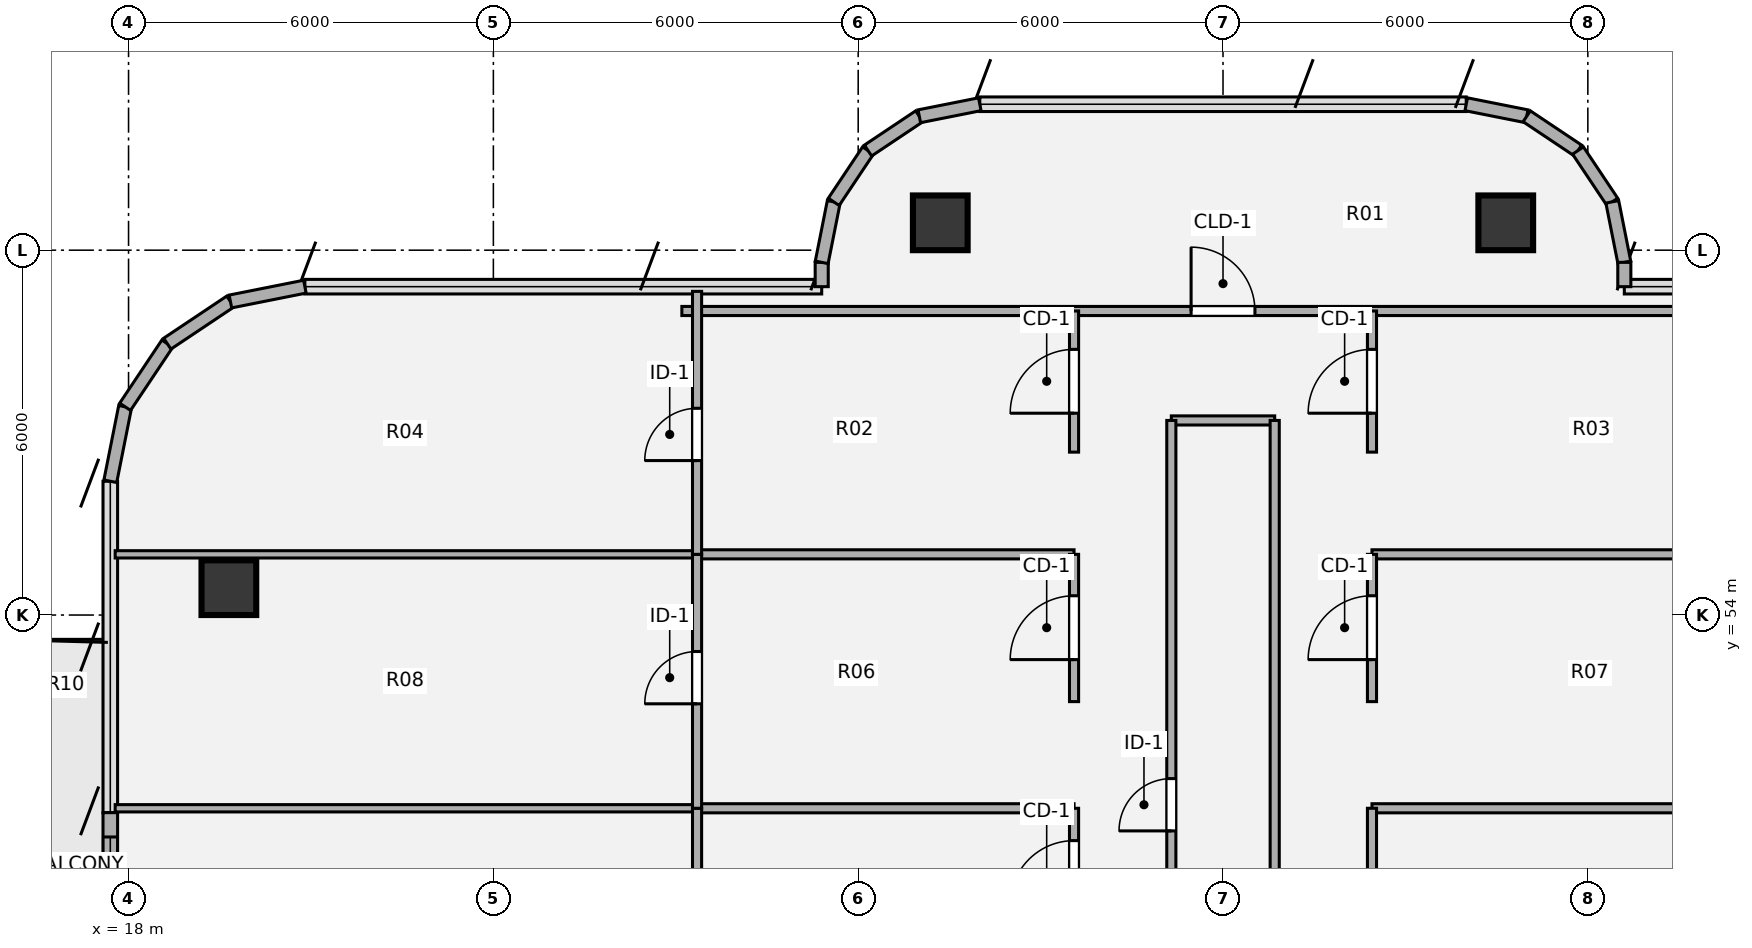
"""IFC4 building model, lengths in metres.
Left out: names, types, materials, properties, quantities, classifications, styles, units other than length and angle.
Written with IfcOpenShell. Run it as: python <this file> out.ifc"""

import sys

from ifc_helpers import new_model, si_unit, direction, frame, frame_2d, origin, origin_2d, place, context, subcontext, project, spatial, rectangle, hollow_circle, extrude, source, transform, mapped, element, fill, save


model = new_model("IFC4")
c1 = context("Model", 3, precision=1e-05, world=origin(), true_north=direction((0.0, 1.0)))
c2 = subcontext(c1, "Body", "Model", "MODEL_VIEW")
j1 = project(units=[si_unit("LENGTHUNIT", "METRE"), si_unit("PLANEANGLEUNIT", "RADIAN")], contexts=[c1])
p1 = place(None, origin())
s1 = spatial("IfcSite", under=j1, at=p1, CompositionType="ELEMENT")
p2 = place(p1, origin())
s2 = spatial("IfcBuilding", under=s1, at=p2, CompositionType="ELEMENT")
p3 = place(p2, frame((0.0, 0.0, 264.6)))
s3 = spatial("IfcBuildingStorey", under=s2, at=p3, CompositionType="ELEMENT", Elevation=264.6)
m1 = source(origin(), c2, "Body", "SweptSolid", [
    extrude(hollow_circle(Radius=0.45, WallThickness=0.032, at=origin_2d()), origin(), (0.0, 0.0, 1.0), 3.78),
])
for number, where, z_axis, x_axis in (
    (1, (19.65, 54.45, 0.0), (0.0, 0.0, 1.0), (1.0, 0.0, 0.0)),
    (2, (31.35, 60.45, 0.0), (0.0, 0.0, 1.0), (1.0, 0.0, 0.0)),
    (3, (40.65, 60.45, 0.0), (0.0, 0.0, 1.0), (1.0, 0.0, 0.0)),
):
    element("IfcColumn", number, at=place(p3, frame(where, z_axis=z_axis, x_axis=x_axis)), inside=s3, PredefinedType="COLUMN", context=c2, shape_type="MappedRepresentation", body=[
        mapped(m1, transform((0.0, 0.0, 0.0), x_axis=(1.0, 0.0, 0.0), y_axis=(0.0, 1.0, 0.0), z_axis=(0.0, 0.0, 1.0), scale=1.0)),
    ])
p4 = place(p3, frame((17.7, 47.15, 0.0), z_axis=(0.0, 0.0, 1.0), x_axis=(0.0, 1.0, 0.0)))
e4 = element("IfcWall", 4, at=p4, inside=s3, PredefinedType="SOLIDWALL", context=c2, shape_type="SweptSolid", body=[
    extrude(rectangle(XDim=3.6, YDim=0.24, at=frame_2d((1.8, 0.0))), origin(), (0.0, 0.0, 1.0), 3.53),
])
p5 = place(p4, frame((0.4, 0.0, 0.0)))
e5 = element("IfcOpeningElement", 5, at=p5, cuts=e4, PredefinedType="OPENING", context=c2, shape_type="SweptSolid", body=[
    extrude(rectangle(XDim=1.05, YDim=2.15, at=origin_2d()), frame((0.525, 0.13, 1.075), z_axis=(0.0, -1.0, 0.0), x_axis=(1.0, 0.0, 0.0)), (0.0, 0.0, 1.0), 0.26),
])
p6 = place(p4, frame((1.85, 0.0, 0.85)))
e6 = element("IfcOpeningElement", 6, at=p6, cuts=e4, PredefinedType="OPENING", context=c2, shape_type="SweptSolid", body=[
    extrude(rectangle(XDim=1.35, YDim=1.35, at=origin_2d()), frame((0.675, 0.13, 0.675), z_axis=(0.0, -1.0, 0.0), x_axis=(1.0, 0.0, 0.0)), (0.0, 0.0, 1.0), 0.26),
])
for number, where, z_axis, x_axis in (
    (7, (17.7, 56.2, 0.0), (0.0, 0.0, 1.0), (0.195, 0.981, 0.0)),
    (8, (17.944, 57.425, 0.0), (0.0, 0.0, 1.0), (0.556, 0.831, 0.0)),
    (9, (18.637, 58.463, 0.0), (0.0, 0.0, 1.0), (0.831, 0.556, 0.0)),
    (10, (19.675, 59.156, 0.0), (0.0, 0.0, 1.0), (0.981, 0.195, 0.0)),
):
    element("IfcWall", number, at=place(p3, frame(where, z_axis=z_axis, x_axis=x_axis)), inside=s3, PredefinedType="SOLIDWALL", context=c2, shape_type="SweptSolid", body=[
        extrude(rectangle(XDim=1.249, YDim=0.215, at=frame_2d((0.624, 0.0))), origin(), (0.0, 0.0, 1.0), 3.53),
    ])
p7 = place(p3, frame((29.4, 59.4, 0.0), z_axis=(0.0, 0.0, 1.0), x_axis=(0.0, 1.0, 0.0)))
e11 = element("IfcWall", 11, at=p7, inside=s3, PredefinedType="SOLIDWALL", context=c2, shape_type="SweptSolid", body=[
    extrude(rectangle(XDim=0.4, YDim=0.215, at=frame_2d((0.2, 0.0))), origin(), (0.0, 0.0, 1.0), 3.53),
])
p8 = place(p3, frame((29.4, 59.8, 0.0), z_axis=(0.0, 0.0, 1.0), x_axis=(0.195190360752, 0.980765376158, 0.0)))
e12 = element("IfcWall", 12, at=p8, inside=s3, PredefinedType="SOLIDWALL", context=c2, shape_type="SweptSolid", body=[
    extrude(rectangle(XDim=1.014, YDim=0.215, at=frame_2d((0.507, 0.0))), origin(), (0.0, 0.0, 1.0), 3.53),
])
p9 = place(p3, frame((29.598, 60.795, 0.0), z_axis=(0.0, 0.0, 1.0), x_axis=(0.555643898837, 0.831420385657, 0.0)))
e13 = element("IfcWall", 13, at=p9, inside=s3, PredefinedType="SOLIDWALL", context=c2, shape_type="SweptSolid", body=[
    extrude(rectangle(XDim=1.015, YDim=0.215, at=frame_2d((0.507, 0.0))), origin(), (0.0, 0.0, 1.0), 3.53),
])
p10 = place(p3, frame((30.162, 61.638, 0.0), z_axis=(0.0, 0.0, 1.0), x_axis=(0.831346067305, 0.555755086685, 0.0)))
e14 = element("IfcWall", 14, at=p10, inside=s3, PredefinedType="SOLIDWALL", context=c2, shape_type="SweptSolid", body=[
    extrude(rectangle(XDim=1.014, YDim=0.215, at=frame_2d((0.507, 0.0))), origin(), (0.0, 0.0, 1.0), 3.53),
])
for number, where, z_axis, x_axis in (
    (15, (31.005, 62.202, 0.0), (0.0, 0.0, 1.0), (0.981, 0.195, 0.0)),
    (16, (40.0, 62.4, 0.0), (0.0, 0.0, 1.0), (0.981, -0.195, 0.0)),
):
    element("IfcWall", number, at=place(p3, frame(where, z_axis=z_axis, x_axis=x_axis)), inside=s3, PredefinedType="SOLIDWALL", context=c2, shape_type="SweptSolid", body=[
        extrude(rectangle(XDim=1.015, YDim=0.215, at=frame_2d((0.507, 0.0))), origin(), (0.0, 0.0, 1.0), 3.53),
    ])
p11 = place(p3, frame((40.995, 62.202, 0.0), z_axis=(0.0, 0.0, 1.0), x_axis=(0.831346067305, -0.555755086685, 0.0)))
e17 = element("IfcWall", 17, at=p11, inside=s3, PredefinedType="SOLIDWALL", context=c2, shape_type="SweptSolid", body=[
    extrude(rectangle(XDim=1.014, YDim=0.215, at=frame_2d((0.507, 0.0))), origin(), (0.0, 0.0, 1.0), 3.53),
])
p12 = place(p3, frame((41.838, 61.638, 0.0), z_axis=(0.0, 0.0, 1.0), x_axis=(0.555643898837, -0.831420385657, 0.0)))
e18 = element("IfcWall", 18, at=p12, inside=s3, PredefinedType="SOLIDWALL", context=c2, shape_type="SweptSolid", body=[
    extrude(rectangle(XDim=1.015, YDim=0.215, at=frame_2d((0.507, 0.0))), origin(), (0.0, 0.0, 1.0), 3.53),
])
p13 = place(p3, frame((42.402, 60.795, 0.0), z_axis=(0.0, 0.0, 1.0), x_axis=(0.195190360752, -0.980765376158, 0.0)))
e19 = element("IfcWall", 19, at=p13, inside=s3, PredefinedType="SOLIDWALL", context=c2, shape_type="SweptSolid", body=[
    extrude(rectangle(XDim=1.014, YDim=0.215, at=frame_2d((0.507, 0.0))), origin(), (0.0, 0.0, 1.0), 3.53),
])
p14 = place(p3, frame((42.6, 59.8, 0.0), z_axis=(0.0, 0.0, 1.0), x_axis=(0.0, -1.0, 0.0)))
e20 = element("IfcWall", 20, at=p14, inside=s3, PredefinedType="SOLIDWALL", context=c2, shape_type="SweptSolid", body=[
    extrude(rectangle(XDim=0.4, YDim=0.215, at=frame_2d((0.2, 0.0))), origin(), (0.0, 0.0, 1.0), 3.53),
])
p15 = place(p3, frame((17.78, 50.822, 0.0), z_axis=(0.0, 0.0, 1.0), x_axis=(1.0, 0.0, 0.0)))
e21 = element("IfcWall", 21, at=p15, inside=s3, PredefinedType="PARTITIONING", context=c2, shape_type="SweptSolid", body=[
    extrude(rectangle(XDim=9.57, YDim=0.12, at=frame_2d((4.785, 0.0))), origin(), (0.0, 0.0, 1.0), 2.982),
])
p16 = place(p3, frame((27.35, 50.822, 0.0), z_axis=(0.0, 0.0, 1.0), x_axis=(1.0, 0.0, 0.0)))
e22 = element("IfcWall", 22, at=p16, inside=s3, PredefinedType="PARTITIONING", context=c2, shape_type="SweptSolid", body=[
    extrude(rectangle(XDim=6.2, YDim=0.15, at=frame_2d((3.1, 0.0))), origin(), (0.0, 0.0, 1.0), 2.982),
])
p17 = place(p3, frame((38.45, 50.822, 0.0), z_axis=(0.0, 0.0, 1.0), x_axis=(1.0, 0.0, 0.0)))
e23 = element("IfcWall", 23, at=p17, inside=s3, PredefinedType="PARTITIONING", context=c2, shape_type="SweptSolid", body=[
    extrude(rectangle(XDim=15.77, YDim=0.15, at=frame_2d((7.885, 0.0))), origin(), (0.0, 0.0, 1.0), 2.982),
])
p18 = place(p3, frame((17.78, 54.998, 0.0), z_axis=(0.0, 0.0, 1.0), x_axis=(1.0, 0.0, 0.0)))
e24 = element("IfcWall", 24, at=p18, inside=s3, PredefinedType="PARTITIONING", context=c2, shape_type="SweptSolid", body=[
    extrude(rectangle(XDim=9.57, YDim=0.12, at=frame_2d((4.785, 0.0))), origin(), (0.0, 0.0, 1.0), 3.5),
])
for number, where, z_axis, x_axis in (
    (25, (27.35, 54.998, 0.0), (0.0, 0.0, 1.0), (1.0, 0.0, 0.0)),
    (26, (38.45, 54.998, 0.0), (0.0, 0.0, 1.0), (1.0, 0.0, 0.0)),
):
    element("IfcWall", number, at=place(p3, frame(where, z_axis=z_axis, x_axis=x_axis)), inside=s3, PredefinedType="PARTITIONING", context=c2, shape_type="SweptSolid", body=[
        extrude(rectangle(XDim=6.2, YDim=0.15, at=frame_2d((3.1, 0.0))), origin(), (0.0, 0.0, 1.0), 3.259),
    ])
p19 = place(p3, frame((35.15, 57.2, 0.0), z_axis=(0.0, 0.0, 1.0), x_axis=(1.0, 0.0, 0.0)))
e27 = element("IfcWall", 27, at=p19, inside=s3, PredefinedType="PARTITIONING", context=c2, shape_type="SweptSolid", body=[
    extrude(rectangle(XDim=1.7, YDim=0.15, at=frame_2d((0.85, 0.0))), origin(), (0.0, 0.0, 1.0), 3.308),
])
p20 = place(p3, frame((27.1, 59.0, 0.0), z_axis=(0.0, 0.0, 1.0), x_axis=(1.0, 0.0, 0.0)))
e28 = element("IfcWall", 28, at=p20, inside=s3, PredefinedType="PARTITIONING", context=c2, shape_type="SweptSolid", body=[
    extrude(rectangle(XDim=17.8, YDim=0.15, at=frame_2d((8.9, 0.0))), origin(), (0.0, 0.0, 1.0), 3.308),
])
p21 = place(p20, frame((8.375, 0.0, 0.0)))
e29 = element("IfcOpeningElement", 29, at=p21, cuts=e28, PredefinedType="OPENING", context=c2, shape_type="SweptSolid", body=[
    extrude(rectangle(XDim=1.05, YDim=2.1, at=origin_2d()), frame((0.525, 0.085, 1.05), z_axis=(0.0, -1.0, 0.0), x_axis=(1.0, 0.0, 0.0)), (0.0, 0.0, 1.0), 0.17),
])
p22 = place(p3, frame((27.35, 46.298, 0.0), z_axis=(0.0, 0.0, 1.0), x_axis=(0.0, 1.0, 0.0)))
e30 = element("IfcWall", 30, at=p22, inside=s3, PredefinedType="PARTITIONING", context=c2, shape_type="SweptSolid", body=[
    extrude(rectangle(XDim=4.524, YDim=0.15, at=frame_2d((2.262, 0.0))), origin(), (0.0, 0.0, 1.0), 3.5),
])
p23 = place(p22, frame((1.742, 0.0, 0.0)))
e31 = element("IfcOpeningElement", 31, at=p23, cuts=e30, PredefinedType="OPENING", context=c2, shape_type="SweptSolid", body=[
    extrude(rectangle(XDim=0.86, YDim=2.1, at=origin_2d()), frame((0.43, 0.085, 1.05), z_axis=(0.0, -1.0, 0.0), x_axis=(1.0, 0.0, 0.0)), (0.0, 0.0, 1.0), 0.17),
])
p24 = place(p3, frame((27.35, 50.822, 0.0), z_axis=(0.0, 0.0, 1.0), x_axis=(0.0, 1.0, 0.0)))
e32 = element("IfcWall", 32, at=p24, inside=s3, PredefinedType="PARTITIONING", context=c2, shape_type="SweptSolid", body=[
    extrude(rectangle(XDim=4.176, YDim=0.15, at=frame_2d((2.088, 0.0))), origin(), (0.0, 0.0, 1.0), 3.5),
])
p25 = place(p24, frame((1.718, 0.0, 0.0)))
e33 = element("IfcOpeningElement", 33, at=p25, cuts=e32, PredefinedType="OPENING", context=c2, shape_type="SweptSolid", body=[
    extrude(rectangle(XDim=0.86, YDim=2.1, at=origin_2d()), frame((0.43, 0.085, 1.05), z_axis=(0.0, -1.0, 0.0), x_axis=(1.0, 0.0, 0.0)), (0.0, 0.0, 1.0), 0.17),
])
p26 = place(p3, frame((27.35, 54.998, 0.0), z_axis=(0.0, 0.0, 1.0), x_axis=(0.0, 1.0, 0.0)))
e34 = element("IfcWall", 34, at=p26, inside=s3, PredefinedType="PARTITIONING", context=c2, shape_type="SweptSolid", body=[
    extrude(rectangle(XDim=4.324, YDim=0.15, at=frame_2d((2.162, 0.0))), origin(), (0.0, 0.0, 1.0), 3.5),
])
p27 = place(p26, frame((1.542, 0.0, 0.0)))
e35 = element("IfcOpeningElement", 35, at=p27, cuts=e34, PredefinedType="OPENING", context=c2, shape_type="SweptSolid", body=[
    extrude(rectangle(XDim=0.86, YDim=2.1, at=origin_2d()), frame((0.43, 0.085, 1.05), z_axis=(0.0, -1.0, 0.0), x_axis=(1.0, 0.0, 0.0)), (0.0, 0.0, 1.0), 0.17),
])
p28 = place(p3, frame((33.55, 48.698, 0.0), z_axis=(0.0, 0.0, 1.0), x_axis=(0.0, 1.0, 0.0)))
e36 = element("IfcWall", 36, at=p28, inside=s3, PredefinedType="PARTITIONING", context=c2, shape_type="SweptSolid", body=[
    extrude(rectangle(XDim=2.124, YDim=0.15, at=frame_2d((1.062, 0.0))), origin(), (0.0, 0.0, 1.0), 3.5),
])
p29 = place(p28, frame((0.542, 0.0, 0.0)))
e37 = element("IfcOpeningElement", 37, at=p29, cuts=e36, PredefinedType="OPENING", context=c2, shape_type="SweptSolid", body=[
    extrude(rectangle(XDim=1.05, YDim=2.1, at=origin_2d()), frame((0.525, 0.085, 1.05), z_axis=(0.0, -1.0, 0.0), x_axis=(1.0, 0.0, 0.0)), (0.0, 0.0, 1.0), 0.17),
])
p30 = place(p3, frame((33.55, 52.576, 0.0), z_axis=(0.0, 0.0, 1.0), x_axis=(0.0, 1.0, 0.0)))
e38 = element("IfcWall", 38, at=p30, inside=s3, PredefinedType="PARTITIONING", context=c2, shape_type="SweptSolid", body=[
    extrude(rectangle(XDim=2.422, YDim=0.15, at=frame_2d((1.211, 0.0))), origin(), (0.0, 0.0, 1.0), 3.5),
])
p31 = place(p30, frame((0.691, 0.0, 0.0)))
e39 = element("IfcOpeningElement", 39, at=p31, cuts=e38, PredefinedType="OPENING", context=c2, shape_type="SweptSolid", body=[
    extrude(rectangle(XDim=1.05, YDim=2.1, at=origin_2d()), frame((0.525, 0.085, 1.05), z_axis=(0.0, -1.0, 0.0), x_axis=(1.0, 0.0, 0.0)), (0.0, 0.0, 1.0), 0.17),
])
p32 = place(p3, frame((33.55, 56.679, 0.0), z_axis=(0.0, 0.0, 1.0), x_axis=(0.0, 1.0, 0.0)))
e40 = element("IfcWall", 40, at=p32, inside=s3, PredefinedType="PARTITIONING", context=c2, shape_type="SweptSolid", body=[
    extrude(rectangle(XDim=2.321, YDim=0.15, at=frame_2d((1.161, 0.0))), origin(), (0.0, 0.0, 1.0), 3.5),
])
p33 = place(p32, frame((0.64, 0.0, 0.0)))
e41 = element("IfcOpeningElement", 41, at=p33, cuts=e40, PredefinedType="OPENING", context=c2, shape_type="SweptSolid", body=[
    extrude(rectangle(XDim=1.05, YDim=2.1, at=origin_2d()), frame((0.525, 0.085, 1.05), z_axis=(0.0, -1.0, 0.0), x_axis=(1.0, 0.0, 0.0)), (0.0, 0.0, 1.0), 0.17),
])
p34 = place(p3, frame((35.15, 44.62, 0.0), z_axis=(0.0, 0.0, 1.0), x_axis=(0.0, 1.0, 0.0)))
e42 = element("IfcWall", 42, at=p34, inside=s3, PredefinedType="PARTITIONING", context=c2, shape_type="SweptSolid", body=[
    extrude(rectangle(XDim=12.58, YDim=0.15, at=frame_2d((6.29, 0.0))), origin(), (0.0, 0.0, 1.0), 3.5),
])
p35 = place(p34, frame((5.83, 0.0, 0.0)))
e43 = element("IfcOpeningElement", 43, at=p35, cuts=e42, PredefinedType="OPENING", context=c2, shape_type="SweptSolid", body=[
    extrude(rectangle(XDim=0.86, YDim=2.1, at=origin_2d()), frame((0.43, 0.085, 1.05), z_axis=(0.0, -1.0, 0.0), x_axis=(1.0, 0.0, 0.0)), (0.0, 0.0, 1.0), 0.17),
])
p36 = place(p3, frame((36.85, 44.62, 0.0), z_axis=(0.0, 0.0, 1.0), x_axis=(0.0, 1.0, 0.0)))
e44 = element("IfcWall", 44, at=p36, inside=s3, PredefinedType="PARTITIONING", context=c2, shape_type="SweptSolid", body=[
    extrude(rectangle(XDim=12.58, YDim=0.15, at=frame_2d((6.29, 0.0))), origin(), (0.0, 0.0, 1.0), 3.5),
])
p37 = place(p3, frame((38.45, 46.298, 0.0), z_axis=(0.0, 0.0, 1.0), x_axis=(0.0, 1.0, 0.0)))
e45 = element("IfcWall", 45, at=p37, inside=s3, PredefinedType="PARTITIONING", context=c2, shape_type="SweptSolid", body=[
    extrude(rectangle(XDim=4.524, YDim=0.15, at=frame_2d((2.262, 0.0))), origin(), (0.0, 0.0, 1.0), 3.5),
])
p38 = place(p37, frame((1.737, 0.0, 0.0)))
e46 = element("IfcOpeningElement", 46, at=p38, cuts=e45, PredefinedType="OPENING", context=c2, shape_type="SweptSolid", body=[
    extrude(rectangle(XDim=1.05, YDim=2.1, at=origin_2d()), frame((0.525, 0.085, 1.05), z_axis=(0.0, -1.0, 0.0), x_axis=(1.0, 0.0, 0.0)), (0.0, 0.0, 1.0), 0.17),
])
p39 = place(p3, frame((38.45, 52.576, 0.0), z_axis=(0.0, 0.0, 1.0), x_axis=(0.0, 1.0, 0.0)))
e47 = element("IfcWall", 47, at=p39, inside=s3, PredefinedType="PARTITIONING", context=c2, shape_type="SweptSolid", body=[
    extrude(rectangle(XDim=2.422, YDim=0.15, at=frame_2d((1.211, 0.0))), origin(), (0.0, 0.0, 1.0), 3.5),
])
p40 = place(p39, frame((0.691, 0.0, 0.0)))
e48 = element("IfcOpeningElement", 48, at=p40, cuts=e47, PredefinedType="OPENING", context=c2, shape_type="SweptSolid", body=[
    extrude(rectangle(XDim=1.05, YDim=2.1, at=origin_2d()), frame((0.525, 0.085, 1.05), z_axis=(0.0, -1.0, 0.0), x_axis=(1.0, 0.0, 0.0)), (0.0, 0.0, 1.0), 0.17),
])
p41 = place(p3, frame((38.45, 56.679, 0.0), z_axis=(0.0, 0.0, 1.0), x_axis=(0.0, 1.0, 0.0)))
e49 = element("IfcWall", 49, at=p41, inside=s3, PredefinedType="PARTITIONING", context=c2, shape_type="SweptSolid", body=[
    extrude(rectangle(XDim=2.321, YDim=0.15, at=frame_2d((1.161, 0.0))), origin(), (0.0, 0.0, 1.0), 3.5),
])
p42 = place(p41, frame((0.64, 0.0, 0.0)))
e50 = element("IfcOpeningElement", 50, at=p42, cuts=e49, PredefinedType="OPENING", context=c2, shape_type="SweptSolid", body=[
    extrude(rectangle(XDim=1.05, YDim=2.1, at=origin_2d()), frame((0.525, 0.085, 1.05), z_axis=(0.0, -1.0, 0.0), x_axis=(1.0, 0.0, 0.0)), (0.0, 0.0, 1.0), 0.17),
])
m2 = source(origin(), c2, "Body", "SweptSolid", [
    extrude(rectangle(XDim=1.35, YDim=1.35, at=origin_2d()), frame((0.675, 0.03, 0.675), z_axis=(0.0, -1.0, 0.0), x_axis=(1.0, 0.0, 0.0)), (0.0, 0.0, 1.0), 0.06),
])
p43 = place(p6, origin())
e51 = element("IfcWindow", 51, at=p43, inside=s3, PartitioningType="SINGLE_PANEL", PredefinedType="WINDOW", context=c2, shape_type="MappedRepresentation", body=[
    mapped(m2, transform((0.0, 0.0, 0.0), x_axis=(1.0, 0.0, 0.0), y_axis=(0.0, 1.0, 0.0), z_axis=(0.0, 0.0, 1.0), scale=1.0)),
])
fill(e6, e51)
m3 = source(origin(), c2, "Body", "SweptSolid", [
    extrude(rectangle(XDim=1.05, YDim=2.1, at=origin_2d()), frame((0.525, 0.025, 1.05), z_axis=(0.0, -1.0, 0.0), x_axis=(1.0, 0.0, 0.0)), (0.0, 0.0, 1.0), 0.05),
])
p44 = place(p21, origin())
e52 = element("IfcDoor", 52, at=p44, inside=s3, OperationType="SINGLE_SWING_LEFT", PredefinedType="DOOR", context=c2, shape_type="MappedRepresentation", body=[
    mapped(m3, transform((0.0, 0.0, 0.0), x_axis=(1.0, 0.0, 0.0), y_axis=(0.0, 1.0, 0.0), z_axis=(0.0, 0.0, 1.0), scale=1.0)),
])
fill(e29, e52)
m4 = source(origin(), c2, "Body", "SweptSolid", [
    extrude(rectangle(XDim=0.86, YDim=2.1, at=origin_2d()), frame((0.43, 0.025, 1.05), z_axis=(0.0, -1.0, 0.0), x_axis=(1.0, 0.0, 0.0)), (0.0, 0.0, 1.0), 0.05),
])
p45 = place(p25, origin())
e53 = element("IfcDoor", 53, at=p45, inside=s3, OperationType="SINGLE_SWING_LEFT", PredefinedType="DOOR", context=c2, shape_type="MappedRepresentation", body=[
    mapped(m4, transform((0.0, 0.0, 0.0), x_axis=(1.0, 0.0, 0.0), y_axis=(0.0, 1.0, 0.0), z_axis=(0.0, 0.0, 1.0), scale=1.0)),
])
fill(e33, e53)
p46 = place(p27, origin())
e54 = element("IfcDoor", 54, at=p46, inside=s3, OperationType="SINGLE_SWING_LEFT", PredefinedType="DOOR", context=c2, shape_type="MappedRepresentation", body=[
    mapped(m4, transform((0.0, 0.0, 0.0), x_axis=(1.0, 0.0, 0.0), y_axis=(0.0, 1.0, 0.0), z_axis=(0.0, 0.0, 1.0), scale=1.0)),
])
fill(e35, e54)
m5 = source(origin(), c2, "Body", "SweptSolid", [
    extrude(rectangle(XDim=1.05, YDim=2.1, at=origin_2d()), frame((0.525, 0.025, 1.05), z_axis=(0.0, -1.0, 0.0), x_axis=(1.0, 0.0, 0.0)), (0.0, 0.0, 1.0), 0.05),
])
p47 = place(p29, origin())
e55 = element("IfcDoor", 55, at=p47, inside=s3, OperationType="SINGLE_SWING_LEFT", PredefinedType="DOOR", context=c2, shape_type="MappedRepresentation", body=[
    mapped(m5, transform((0.0, 0.0, 0.0), x_axis=(1.0, 0.0, 0.0), y_axis=(0.0, 1.0, 0.0), z_axis=(0.0, 0.0, 1.0), scale=1.0)),
])
fill(e37, e55)
p48 = place(p31, origin())
e56 = element("IfcDoor", 56, at=p48, inside=s3, OperationType="SINGLE_SWING_LEFT", PredefinedType="DOOR", context=c2, shape_type="MappedRepresentation", body=[
    mapped(m5, transform((0.0, 0.0, 0.0), x_axis=(1.0, 0.0, 0.0), y_axis=(0.0, 1.0, 0.0), z_axis=(0.0, 0.0, 1.0), scale=1.0)),
])
fill(e39, e56)
p49 = place(p33, origin())
e57 = element("IfcDoor", 57, at=p49, inside=s3, OperationType="SINGLE_SWING_LEFT", PredefinedType="DOOR", context=c2, shape_type="MappedRepresentation", body=[
    mapped(m5, transform((0.0, 0.0, 0.0), x_axis=(1.0, 0.0, 0.0), y_axis=(0.0, 1.0, 0.0), z_axis=(0.0, 0.0, 1.0), scale=1.0)),
])
fill(e41, e57)
p50 = place(p35, origin())
e58 = element("IfcDoor", 58, at=p50, inside=s3, OperationType="SINGLE_SWING_LEFT", PredefinedType="DOOR", context=c2, shape_type="MappedRepresentation", body=[
    mapped(m4, transform((0.0, 0.0, 0.0), x_axis=(1.0, 0.0, 0.0), y_axis=(0.0, 1.0, 0.0), z_axis=(0.0, 0.0, 1.0), scale=1.0)),
])
fill(e43, e58)
p51 = place(p40, origin())
e59 = element("IfcDoor", 59, at=p51, inside=s3, OperationType="SINGLE_SWING_LEFT", PredefinedType="DOOR", context=c2, shape_type="MappedRepresentation", body=[
    mapped(m5, transform((0.0, 0.0, 0.0), x_axis=(1.0, 0.0, 0.0), y_axis=(0.0, 1.0, 0.0), z_axis=(0.0, 0.0, 1.0), scale=1.0)),
])
fill(e48, e59)
p52 = place(p42, origin())
e60 = element("IfcDoor", 60, at=p52, inside=s3, OperationType="SINGLE_SWING_LEFT", PredefinedType="DOOR", context=c2, shape_type="MappedRepresentation", body=[
    mapped(m5, transform((0.0, 0.0, 0.0), x_axis=(1.0, 0.0, 0.0), y_axis=(0.0, 1.0, 0.0), z_axis=(0.0, 0.0, 1.0), scale=1.0)),
])
fill(e50, e60)
save(model, sys.argv[1])
